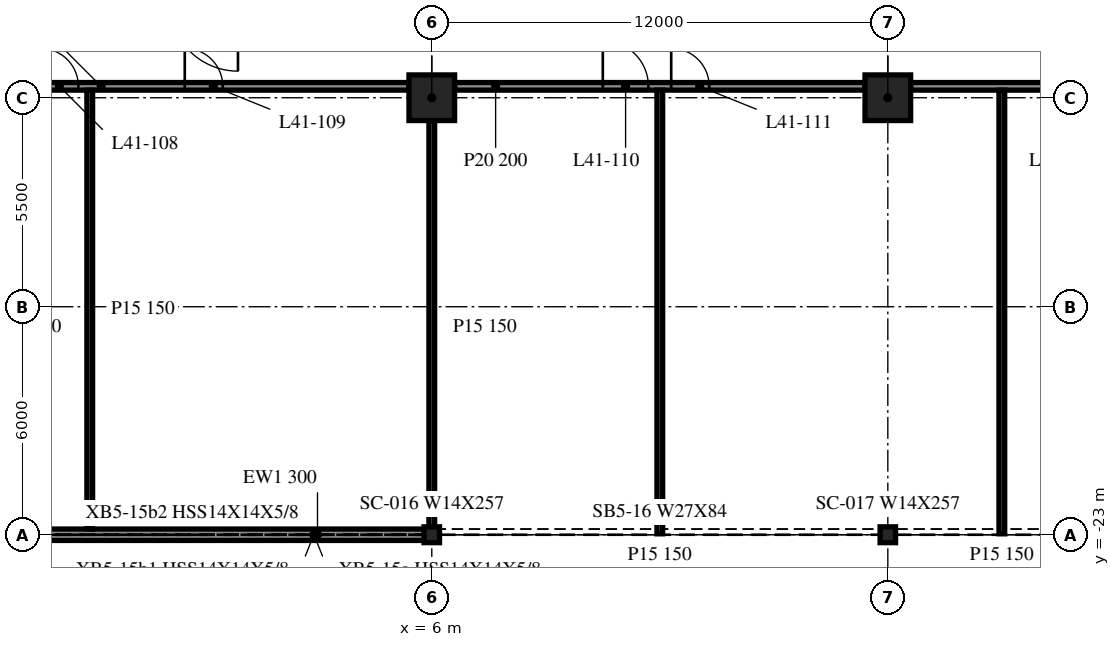
"""IFC4 building model, lengths in metres.
Left out: names, types, materials, properties, quantities, classifications, styles, units other than length and angle.
Written with IfcOpenShell. Run it as: python <this file> out.ifc"""

import sys

from ifc_helpers import new_model, si_unit, direction, frame, frame_2d, origin, origin_2d, place, context, subcontext, project, spatial, rectangle, i_section, extrude, element, fill, save


model = new_model("IFC4")
c1 = context("Model", 3, precision=1e-05, world=origin(), true_north=direction((0.0, 1.0)))
c2 = subcontext(c1, "Body", "Model", "MODEL_VIEW")
j1 = project(units=[si_unit("LENGTHUNIT", "METRE"), si_unit("PLANEANGLEUNIT", "RADIAN")], contexts=[c1])
p1 = place(None, origin())
s1 = spatial("IfcSite", under=j1, at=p1, CompositionType="ELEMENT")
p2 = place(p1, origin())
s2 = spatial("IfcBuilding", under=s1, at=p2, CompositionType="ELEMENT")
p3 = place(p2, frame((0.0, 0.0, 174.4)))
s3 = spatial("IfcBuildingStorey", under=s2, at=p3, CompositionType="ELEMENT", Elevation=174.4)
for number, where, z_axis, x_axis in (
    (1, (6.0, -11.5, -0.34), (0.0, 0.0, 1.0), (1.0, 0.0, 0.0)),
    (2, (18.0, -11.5, -0.34), (0.0, 0.0, 1.0), (1.0, 0.0, 0.0)),
):
    element("IfcColumn", number, at=place(p3, frame(where, z_axis=z_axis, x_axis=x_axis)), inside=s3, PredefinedType="COLUMN", context=c2, shape_type="SweptSolid", body=[
        extrude(rectangle(XDim=1.2, YDim=1.2, at=origin_2d()), origin(), (0.0, 0.0, 1.0), 3.8),
    ])
for number, where, z_axis, x_axis in (
    (3, (6.0, -23.0, -0.34), (0.0, 0.0, 1.0), (1.0, 0.0, 0.0)),
    (4, (18.0, -23.0, -0.34), (0.0, 0.0, 1.0), (1.0, 0.0, 0.0)),
):
    element("IfcColumn", number, at=place(p3, frame(where, z_axis=z_axis, x_axis=x_axis)), inside=s3, PredefinedType="COLUMN", context=c2, shape_type="SweptSolid", body=[
        extrude(i_section(OverallWidth=0.406, OverallDepth=0.417, WebThickness=0.03, FlangeThickness=0.048, at=origin_2d()), origin(), (0.0, 0.0, 1.0), 3.8),
    ])
p4 = place(p3, frame((-5.985, -23.0, 0.0), z_axis=(0.0, 0.0, 1.0), x_axis=(1.0, 0.0, 0.0)))
e5 = element("IfcWall", 5, at=p4, inside=s3, PredefinedType="NOTDEFINED", context=c2, shape_type="SweptSolid", body=[
    extrude(rectangle(XDim=11.97, YDim=0.3, at=frame_2d((5.985, 0.0))), origin(), (0.0, 0.0, 1.0), 2.782),
])
p5 = place(p3, frame((-5.4, -11.2, 0.0), z_axis=(0.0, 0.0, 1.0), x_axis=(1.0, 0.0, 0.0)))
e6 = element("IfcWall", 6, at=p5, inside=s3, PredefinedType="PARTITIONING", context=c2, shape_type="SweptSolid", body=[
    extrude(rectangle(XDim=10.8, YDim=0.2, at=frame_2d((5.4, 0.0))), origin(), (0.0, 0.0, 1.0), 3.46),
])
p6 = place(p5, frame((1.1, 0.0, 0.0)))
e7 = element("IfcOpeningElement", 7, at=p6, cuts=e6, PredefinedType="OPENING", context=c2, shape_type="SweptSolid", body=[
    extrude(rectangle(XDim=1.0, YDim=2.1, at=frame_2d((0.5, 1.05))), frame((0.0, 0.11, 0.0), z_axis=(0.0, -1.0, 0.0), x_axis=(1.0, 0.0, 0.0)), (0.0, 0.0, 1.0), 0.22),
])
p7 = place(p5, frame((4.9, 0.0, 0.0)))
e8 = element("IfcOpeningElement", 8, at=p7, cuts=e6, PredefinedType="OPENING", context=c2, shape_type="SweptSolid", body=[
    extrude(rectangle(XDim=1.0, YDim=2.1, at=frame_2d((0.5, 1.05))), frame((0.0, 0.11, 0.0), z_axis=(0.0, -1.0, 0.0), x_axis=(1.0, 0.0, 0.0)), (0.0, 0.0, 1.0), 0.22),
])
p8 = place(p3, frame((6.6, -11.2, 0.0), z_axis=(0.0, 0.0, 1.0), x_axis=(1.0, 0.0, 0.0)))
e9 = element("IfcWall", 9, at=p8, inside=s3, PredefinedType="PARTITIONING", context=c2, shape_type="SweptSolid", body=[
    extrude(rectangle(XDim=10.8, YDim=0.2, at=frame_2d((5.4, 0.0))), origin(), (0.0, 0.0, 1.0), 3.46),
])
p9 = place(p8, frame((3.9, 0.0, 0.0)))
e10 = element("IfcOpeningElement", 10, at=p9, cuts=e9, PredefinedType="OPENING", context=c2, shape_type="SweptSolid", body=[
    extrude(rectangle(XDim=1.2, YDim=2.1, at=frame_2d((0.6, 1.05))), frame((0.0, 0.11, 0.0), z_axis=(0.0, -1.0, 0.0), x_axis=(1.0, 0.0, 0.0)), (0.0, 0.0, 1.0), 0.22),
])
p10 = place(p8, frame((5.7, 0.0, 0.0)))
e11 = element("IfcOpeningElement", 11, at=p10, cuts=e9, PredefinedType="OPENING", context=c2, shape_type="SweptSolid", body=[
    extrude(rectangle(XDim=1.0, YDim=2.1, at=frame_2d((0.5, 1.05))), frame((0.0, 0.11, 0.0), z_axis=(0.0, -1.0, 0.0), x_axis=(1.0, 0.0, 0.0)), (0.0, 0.0, 1.0), 0.22),
])
p11 = place(p3, frame((18.6, -11.2, 0.0), z_axis=(0.0, 0.0, 1.0), x_axis=(1.0, 0.0, 0.0)))
e12 = element("IfcWall", 12, at=p11, inside=s3, PredefinedType="PARTITIONING", context=c2, shape_type="SweptSolid", body=[
    extrude(rectangle(XDim=10.8, YDim=0.2, at=frame_2d((5.4, 0.0))), origin(), (0.0, 0.0, 1.0), 3.46),
])
p12 = place(p11, frame((3.9, 0.0, 0.0)))
e13 = element("IfcOpeningElement", 13, at=p12, cuts=e12, PredefinedType="OPENING", context=c2, shape_type="SweptSolid", body=[
    extrude(rectangle(XDim=1.2, YDim=2.1, at=frame_2d((0.6, 1.05))), frame((0.0, 0.11, 0.0), z_axis=(0.0, -1.0, 0.0), x_axis=(1.0, 0.0, 0.0)), (0.0, 0.0, 1.0), 0.22),
])
p13 = place(p11, frame((5.7, 0.0, 0.0)))
e14 = element("IfcOpeningElement", 14, at=p13, cuts=e12, PredefinedType="OPENING", context=c2, shape_type="SweptSolid", body=[
    extrude(rectangle(XDim=1.0, YDim=2.1, at=frame_2d((0.5, 1.05))), frame((0.0, 0.11, 0.0), z_axis=(0.0, -1.0, 0.0), x_axis=(1.0, 0.0, 0.0)), (0.0, 0.0, 1.0), 0.22),
])
p14 = place(p3, frame((-3.0, -22.85, 0.0), z_axis=(0.0, 0.0, 1.0), x_axis=(0.0, 1.0, 0.0)))
e15 = element("IfcWall", 15, at=p14, inside=s3, PredefinedType="PARTITIONING", context=c2, shape_type="SweptSolid", body=[
    extrude(rectangle(XDim=11.55, YDim=0.15, at=frame_2d((5.775, 0.0))), origin(), (0.0, 0.0, 1.0), 3.46),
])
p15 = place(p3, frame((6.0, -22.975, 0.0), z_axis=(0.0, 0.0, 1.0), x_axis=(0.0, 1.0, 0.0)))
e16 = element("IfcWall", 16, at=p15, inside=s3, PredefinedType="PARTITIONING", context=c2, shape_type="SweptSolid", body=[
    extrude(rectangle(XDim=10.875, YDim=0.15, at=frame_2d((5.438, 0.0))), origin(), (0.0, 0.0, 1.0), 3.46),
])
for number, where, z_axis, x_axis in (
    (17, (12.0, -22.975, 0.0), (0.0, 0.0, 1.0), (0.0, 1.0, 0.0)),
    (18, (21.0, -22.975, 0.0), (0.0, 0.0, 1.0), (0.0, 1.0, 0.0)),
):
    element("IfcWall", number, at=place(p3, frame(where, z_axis=z_axis, x_axis=x_axis)), inside=s3, PredefinedType="PARTITIONING", context=c2, shape_type="SweptSolid", body=[
        extrude(rectangle(XDim=11.675, YDim=0.15, at=frame_2d((5.837, 0.0))), origin(), (0.0, 0.0, 1.0), 3.46),
    ])
p16 = place(p6, origin())
e19 = element("IfcDoor", 19, at=p16, inside=s3, OperationType="SINGLE_SWING_RIGHT", PredefinedType="DOOR", context=c2, shape_type="SweptSolid", body=[
    extrude(rectangle(XDim=1.0, YDim=2.1, at=frame_2d((0.5, 1.05))), frame((0.0, 0.025, 0.0), z_axis=(0.0, -1.0, 0.0), x_axis=(1.0, 0.0, 0.0)), (0.0, 0.0, 1.0), 0.05),
])
fill(e7, e19)
p17 = place(p7, origin())
e20 = element("IfcDoor", 20, at=p17, inside=s3, OperationType="SINGLE_SWING_RIGHT", PredefinedType="DOOR", context=c2, shape_type="SweptSolid", body=[
    extrude(rectangle(XDim=1.0, YDim=2.1, at=frame_2d((0.5, 1.05))), frame((0.0, 0.025, 0.0), z_axis=(0.0, -1.0, 0.0), x_axis=(1.0, 0.0, 0.0)), (0.0, 0.0, 1.0), 0.05),
])
fill(e8, e20)
p18 = place(p9, origin())
e21 = element("IfcDoor", 21, at=p18, inside=s3, OperationType="SINGLE_SWING_RIGHT", PredefinedType="DOOR", context=c2, shape_type="SweptSolid", body=[
    extrude(rectangle(XDim=1.2, YDim=2.1, at=frame_2d((0.6, 1.05))), frame((0.0, 0.025, 0.0), z_axis=(0.0, -1.0, 0.0), x_axis=(1.0, 0.0, 0.0)), (0.0, 0.0, 1.0), 0.05),
])
fill(e10, e21)
p19 = place(p10, origin())
e22 = element("IfcDoor", 22, at=p19, inside=s3, OperationType="SINGLE_SWING_LEFT", PredefinedType="DOOR", context=c2, shape_type="SweptSolid", body=[
    extrude(rectangle(XDim=1.0, YDim=2.1, at=frame_2d((0.5, 1.05))), frame((0.0, 0.025, 0.0), z_axis=(0.0, -1.0, 0.0), x_axis=(1.0, 0.0, 0.0)), (0.0, 0.0, 1.0), 0.05),
])
fill(e11, e22)
save(model, sys.argv[1])
